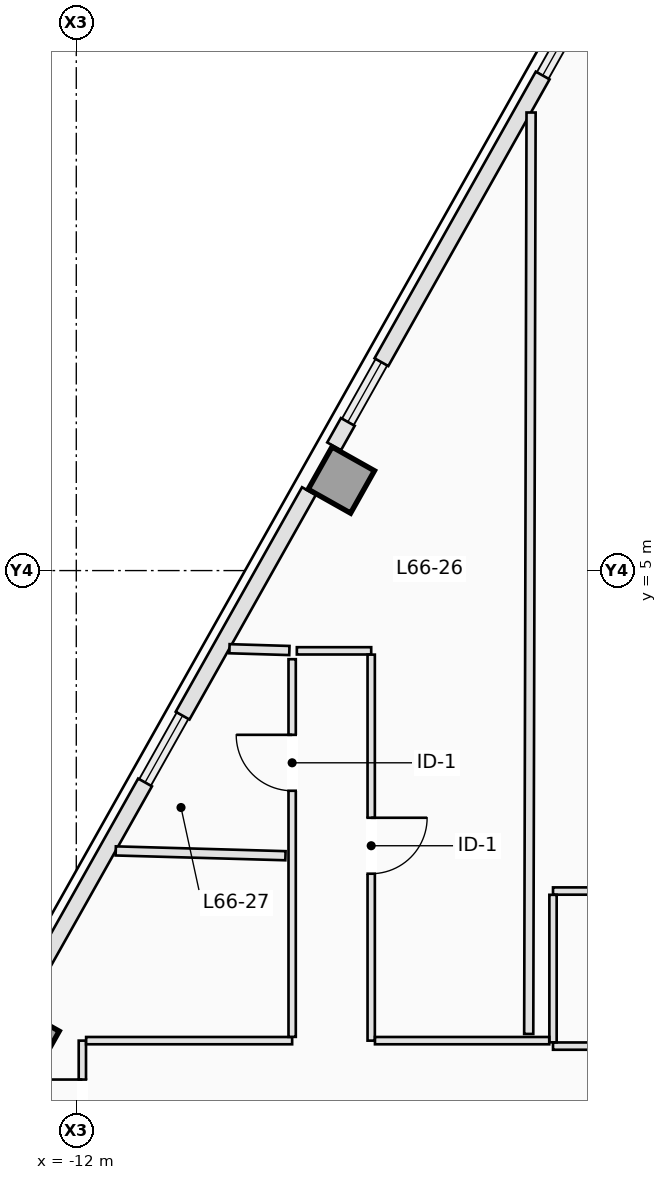
"""IFC4 building model, lengths in metres.
Left out: names, types, materials, properties, quantities, classifications, styles, units other than length and angle.
Written with IfcOpenShell. Run it as: python <this file> out.ifc"""

import sys

from ifc_helpers import new_model, si_unit, direction, frame, frame_2d, origin, origin_2d, place, context, subcontext, project, spatial, rectangle, extrude, element, fill, save


model = new_model("IFC4")
c1 = context("Model", 3, precision=1e-05, world=origin(), true_north=direction((0.0, 1.0)))
c2 = subcontext(c1, "Body", "Model", "MODEL_VIEW")
j1 = project(units=[si_unit("LENGTHUNIT", "METRE"), si_unit("PLANEANGLEUNIT", "RADIAN")], contexts=[c1])
p1 = place(None, origin())
s1 = spatial("IfcSite", under=j1, at=p1, CompositionType="ELEMENT")
p2 = place(p1, origin())
s2 = spatial("IfcBuilding", under=s1, at=p2, CompositionType="ELEMENT")
p3 = place(p2, frame((0.0, 0.0, 239.4)))
s3 = spatial("IfcBuildingStorey", under=s2, at=p3, CompositionType="ELEMENT", Elevation=239.4)
for number, where, z_axis, x_axis in (
    (1, (-7.642, 6.489, 0.0), (0.0, 0.0, 1.0), (-0.872, 0.49, 0.0)),
    (2, (-12.825, -2.727, 0.0), (0.0, 0.0, 1.0), (-0.872, 0.49, 0.0)),
):
    element("IfcColumn", number, at=place(p3, frame(where, z_axis=z_axis, x_axis=x_axis)), inside=s3, PredefinedType="COLUMN", context=c2, shape_type="SweptSolid", body=[
        extrude(rectangle(XDim=0.8, YDim=0.8, at=origin_2d()), origin(), (0.0, 0.0, 1.0), 3.5),
    ])
p4 = place(p3, frame((-7.76, 7.044, 0.0), z_axis=(0.0, 0.0, 1.0), x_axis=(0.490412424957, 0.871490478116, 0.0)))
e3 = element("IfcWall", 3, at=p4, inside=s3, PredefinedType="STANDARD", context=c2, shape_type="SweptSolid", body=[
    extrude(rectangle(XDim=0.46, YDim=0.26, at=frame_2d((0.23, 0.0))), origin(), (0.0, 0.0, 1.0), 3.25),
])
p5 = place(p3, frame((-6.982, 8.427, 0.0), z_axis=(0.0, 0.0, 1.0), x_axis=(0.490265525523, 0.871573126297, 0.0)))
e4 = element("IfcWall", 4, at=p5, inside=s3, PredefinedType="STANDARD", context=c2, shape_type="SweptSolid", body=[
    extrude(rectangle(XDim=5.409, YDim=0.26, at=frame_2d((2.705, 0.0))), origin(), (0.0, 0.0, 1.0), 3.25),
])
p6 = place(p3, frame((-12.946, -2.177, 0.0), z_axis=(0.0, 0.0, 1.0), x_axis=(0.490244825075, 0.871584770109, 0.0)))
e5 = element("IfcWall", 5, at=p6, inside=s3, PredefinedType="STANDARD", context=c2, shape_type="SweptSolid", body=[
    extrude(rectangle(XDim=4.237, YDim=0.26, at=frame_2d((2.119, 0.0))), origin(), (0.0, 0.0, 1.0), 3.25),
])
p7 = place(p3, frame((-10.251, 2.615, 0.0), z_axis=(0.0, 0.0, 1.0), x_axis=(0.490269447258, 0.871570920284, 0.0)))
e6 = element("IfcWall", 6, at=p7, inside=s3, PredefinedType="STANDARD", context=c2, shape_type="SweptSolid", body=[
    extrude(rectangle(XDim=4.237, YDim=0.26, at=frame_2d((2.118, 0.0))), origin(), (0.0, 0.0, 1.0), 3.25),
])
p8 = place(p3, frame((-4.16, -2.82, 0.0), z_axis=(0.0, 0.0, 1.0), x_axis=(1.0, 0.0, 0.0)))
e7 = element("IfcWall", 7, at=p8, inside=s3, PredefinedType="PARTITIONING", context=c2, shape_type="SweptSolid", body=[
    extrude(rectangle(XDim=2.62, YDim=0.12, at=frame_2d((1.31, 0.0))), origin(), (0.0, 0.0, 1.0), 2.943),
])
p9 = place(p8, frame((0.82, 0.0, 0.0)))
e8 = element("IfcOpeningElement", 8, at=p9, cuts=e7, PredefinedType="OPENING", context=c2, shape_type="SweptSolid", body=[
    extrude(rectangle(XDim=0.9, YDim=2.12, at=frame_2d((0.45, 1.06))), frame((0.0, 0.07, 0.0), z_axis=(0.0, -1.0, 0.0), x_axis=(1.0, 0.0, 0.0)), (0.0, 0.0, 1.0), 0.14),
])
p10 = place(p3, frame((-4.16, -0.27, 0.0), z_axis=(0.0, 0.0, 1.0), x_axis=(1.0, 0.0, 0.0)))
e9 = element("IfcWall", 9, at=p10, inside=s3, PredefinedType="PARTITIONING", context=c2, shape_type="SweptSolid", body=[
    extrude(rectangle(XDim=2.62, YDim=0.12, at=frame_2d((1.31, 0.0))), origin(), (0.0, 0.0, 1.0), 3.25),
])
p11 = place(p3, frame((-4.16, -2.758, 0.0), z_axis=(0.0, 0.0, 1.0), x_axis=(0.0, 1.0, 0.0)))
e10 = element("IfcWall", 10, at=p11, inside=s3, PredefinedType="PARTITIONING", context=c2, shape_type="SweptSolid", body=[
    extrude(rectangle(XDim=2.426, YDim=0.12, at=frame_2d((1.213, 0.0))), origin(), (0.0, 0.0, 1.0), 3.25),
])
p12 = place(p3, frame((-11.9, -5.073, 0.0), z_axis=(0.0, 0.0, 1.0), x_axis=(0.0, 1.0, 0.0)))
e11 = element("IfcWall", 11, at=p12, inside=s3, PredefinedType="PARTITIONING", context=c2, shape_type="SweptSolid", body=[
    extrude(rectangle(XDim=2.343, YDim=0.12, at=frame_2d((1.171, 0.0))), origin(), (0.0, 0.0, 1.0), 3.25),
])
p13 = place(p12, frame((0.783, 0.0, 0.0)))
e12 = element("IfcOpeningElement", 12, at=p13, cuts=e11, PredefinedType="OPENING", context=c2, shape_type="SweptSolid", body=[
    extrude(rectangle(XDim=0.92, YDim=2.12, at=frame_2d((0.46, 1.06))), frame((0.0, 0.07, 0.0), z_axis=(0.0, -1.0, 0.0), x_axis=(1.0, 0.0, 0.0)), (0.0, 0.0, 1.0), 0.14),
])
p14 = place(p3, frame((-11.838, -2.73, 0.0), z_axis=(0.0, 0.0, 1.0), x_axis=(1.0, 0.0, 0.0)))
e13 = element("IfcWall", 13, at=p14, inside=s3, PredefinedType="PARTITIONING", context=c2, shape_type="SweptSolid", body=[
    extrude(rectangle(XDim=3.388, YDim=0.12, at=frame_2d((1.694, 0.0))), origin(), (0.0, 0.0, 1.0), 3.25),
])
p15 = place(p3, frame((-8.45, -2.668, 0.0), z_axis=(0.0, 0.0, 1.0), x_axis=(0.0, 1.0, 0.0)))
e14 = element("IfcWall", 14, at=p15, inside=s3, PredefinedType="PARTITIONING", context=c2, shape_type="SweptSolid", body=[
    extrude(rectangle(XDim=6.21, YDim=0.12, at=frame_2d((3.105, 0.0))), origin(), (0.0, 0.0, 1.0), 3.25),
])
p16 = place(p15, frame((4.047, 0.0, 0.0)))
e15 = element("IfcOpeningElement", 15, at=p16, cuts=e14, PredefinedType="OPENING", context=c2, shape_type="SweptSolid", body=[
    extrude(rectangle(XDim=0.92, YDim=2.12, at=frame_2d((0.46, 1.06))), frame((0.0, 0.07, 0.0), z_axis=(0.0, -1.0, 0.0), x_axis=(1.0, 0.0, 0.0)), (0.0, 0.0, 1.0), 0.14),
])
p17 = place(p3, frame((-8.373, 3.68, 0.0), z_axis=(0.0, 0.0, 1.0), x_axis=(1.0, 0.0, 0.0)))
e16 = element("IfcWall", 16, at=p17, inside=s3, PredefinedType="PARTITIONING", context=c2, shape_type="SweptSolid", body=[
    extrude(rectangle(XDim=1.223, YDim=0.12, at=frame_2d((0.611, 0.0))), origin(), (0.0, 0.0, 1.0), 3.25),
])
p18 = place(p3, frame((-7.15, 3.618, 0.0), z_axis=(0.0, 0.0, 1.0), x_axis=(0.0, -1.0, 0.0)))
e17 = element("IfcWall", 17, at=p18, inside=s3, PredefinedType="PARTITIONING", context=c2, shape_type="SweptSolid", body=[
    extrude(rectangle(XDim=6.348, YDim=0.12, at=frame_2d((3.174, 0.0))), origin(), (0.0, 0.0, 1.0), 3.25),
])
p19 = place(p18, frame((2.683, 0.0, 0.0)))
e18 = element("IfcOpeningElement", 18, at=p19, cuts=e17, PredefinedType="OPENING", context=c2, shape_type="SweptSolid", body=[
    extrude(rectangle(XDim=0.92, YDim=2.12, at=frame_2d((0.46, 1.06))), frame((0.0, 0.07, 0.0), z_axis=(0.0, -1.0, 0.0), x_axis=(1.0, 0.0, 0.0)), (0.0, 0.0, 1.0), 0.14),
])
p20 = place(p3, frame((-7.088, -2.73, 0.0), z_axis=(0.0, 0.0, 1.0), x_axis=(1.0, 0.0, 0.0)))
e19 = element("IfcWall", 19, at=p20, inside=s3, PredefinedType="PARTITIONING", context=c2, shape_type="SweptSolid", body=[
    extrude(rectangle(XDim=2.866, YDim=0.12, at=frame_2d((1.433, 0.0))), origin(), (0.0, 0.0, 1.0), 3.25),
])
p21 = place(p3, frame((-4.56, -2.62, 0.0), z_axis=(0.0, 0.0, 1.0), x_axis=(0.002561739383, 0.99999671874, 0.0)))
e20 = element("IfcWall", 20, at=p21, inside=s3, PredefinedType="PARTITIONING", context=c2, shape_type="SweptSolid", body=[
    extrude(rectangle(XDim=15.153, YDim=0.15, at=frame_2d((7.577, 0.0))), origin(), (0.0, 0.0, 1.0), 3.25),
])
p22 = place(p3, frame((-8.496, 3.685, 0.0), z_axis=(0.0, 0.0, 1.0), x_axis=(-0.99954299591, 0.030229113907, 0.0)))
e21 = element("IfcWall", 21, at=p22, inside=s3, PredefinedType="PARTITIONING", context=c2, shape_type="SweptSolid", body=[
    extrude(rectangle(XDim=0.985, YDim=0.15, at=frame_2d((0.493, 0.0))), origin(), (0.0, 0.0, 1.0), 3.25),
])
p23 = place(p3, frame((-8.56, 0.311, 0.0), z_axis=(0.0, 0.0, 1.0), x_axis=(-0.999598621545, 0.028330121884, 0.0)))
e22 = element("IfcWall", 22, at=p23, inside=s3, PredefinedType="PARTITIONING", context=c2, shape_type="SweptSolid", body=[
    extrude(rectangle(XDim=2.792, YDim=0.15, at=frame_2d((1.396, 0.0))), origin(), (0.0, 0.0, 1.0), 3.25),
])
p24 = place(p19, origin())
e23 = element("IfcDoor", 23, at=p24, inside=s3, OperationType="SINGLE_SWING_LEFT", PredefinedType="DOOR", context=c2, shape_type="SweptSolid", body=[
    extrude(rectangle(XDim=0.92, YDim=2.12, at=frame_2d((0.46, 1.06))), frame((0.0, 0.025, 0.0), z_axis=(0.0, -1.0, 0.0), x_axis=(1.0, 0.0, 0.0)), (0.0, 0.0, 1.0), 0.05),
])
fill(e18, e23)
p25 = place(p16, origin())
e24 = element("IfcDoor", 24, at=p25, inside=s3, OperationType="SINGLE_SWING_RIGHT", PredefinedType="DOOR", context=c2, shape_type="SweptSolid", body=[
    extrude(rectangle(XDim=0.92, YDim=2.12, at=frame_2d((0.46, 1.06))), frame((0.0, 0.025, 0.0), z_axis=(0.0, -1.0, 0.0), x_axis=(1.0, 0.0, 0.0)), (0.0, 0.0, 1.0), 0.05),
])
fill(e15, e24)
p26 = place(p13, origin())
e25 = element("IfcDoor", 25, at=p26, inside=s3, OperationType="SINGLE_SWING_RIGHT", PredefinedType="DOOR", context=c2, shape_type="SweptSolid", body=[
    extrude(rectangle(XDim=0.92, YDim=2.12, at=frame_2d((0.46, 1.06))), frame((0.0, 0.025, 0.0), z_axis=(0.0, -1.0, 0.0), x_axis=(1.0, 0.0, 0.0)), (0.0, 0.0, 1.0), 0.05),
])
fill(e12, e25)
save(model, sys.argv[1])
